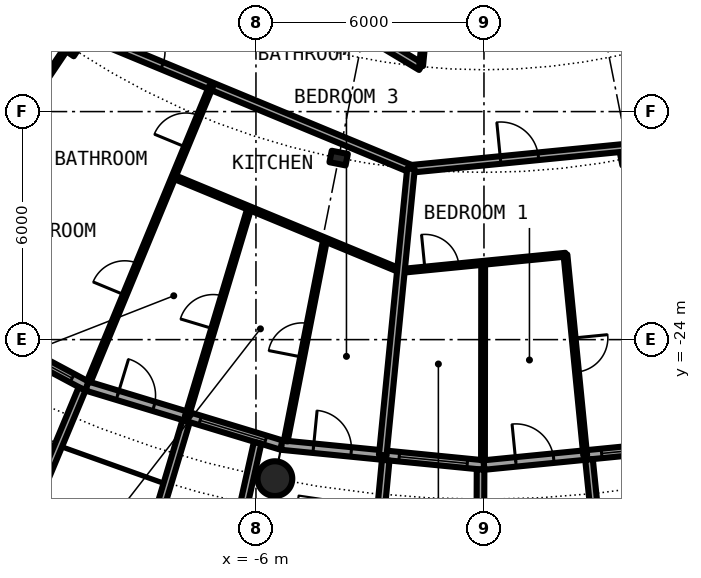
"""IFC4 building model, lengths in metres.
Left out: names, types, materials, properties, quantities, classifications, styles, units other than length and angle.
Written with IfcOpenShell. Run it as: python <this file> out.ifc"""

import sys

from ifc_helpers import new_model, si_unit, direction, frame, frame_2d, origin, origin_2d, place, context, subcontext, project, spatial, rectangle, hollow_circle, i_section, extrude, element, fill, save


model = new_model("IFC4")
c1 = context("Model", 3, precision=1e-05, world=origin(), true_north=direction((0.0, 1.0)))
c2 = subcontext(c1, "Body", "Model", "MODEL_VIEW")
j1 = project(units=[si_unit("LENGTHUNIT", "METRE"), si_unit("PLANEANGLEUNIT", "RADIAN")], contexts=[c1])
p1 = place(None, origin())
s1 = spatial("IfcSite", under=j1, at=p1, CompositionType="ELEMENT")
p2 = place(p1, origin())
s2 = spatial("IfcBuilding", under=s1, at=p2, CompositionType="ELEMENT")
p3 = place(p2, frame((0.0, 0.0, 120.8)))
s3 = spatial("IfcBuildingStorey", under=s2, at=p3, CompositionType="ELEMENT", Elevation=120.8)
p4 = place(p3, frame((-5.501, -27.658, 0.0), z_axis=(0.0, 0.0, 1.0), x_axis=(1.0, 0.0, 0.0)))
e1 = element("IfcColumn", 1, at=p4, inside=s3, PredefinedType="COLUMN", context=c2, shape_type="SweptSolid", body=[
    extrude(hollow_circle(Radius=0.457, WallThickness=0.04, at=origin_2d()), origin(), (0.0, 0.0, 1.0), 3.05),
])
for number, where, z_axis, x_axis in (
    (2, (-10.889, -16.297, 0.0), (0.0, 0.0, 1.0), (-0.556, -0.831, 0.0)),
    (3, (-3.824, -19.223, 0.0), (0.0, 0.0, 1.0), (-0.195, -0.981, 0.0)),
    (4, (3.824, -19.223, 0.0), (0.0, 0.0, 1.0), (0.195, -0.981, 0.0)),
):
    element("IfcColumn", number, at=place(p3, frame(where, z_axis=z_axis, x_axis=x_axis)), inside=s3, PredefinedType="COLUMN", context=c2, shape_type="SweptSolid", body=[
        extrude(i_section(OverallWidth=0.307, OverallDepth=0.432, WebThickness=0.021, FlangeThickness=0.04, FilletRadius=0.027, at=origin_2d()), origin(), (0.0, 0.0, 1.0), 3.05),
    ])
p5 = place(p3, frame((-15.167, -22.699, 0.0), z_axis=(0.0, 0.0, 1.0), x_axis=(0.881915646801, -0.471407246368, 0.0)))
e5 = element("IfcWall", 5, at=p5, inside=s3, PredefinedType="SOLIDWALL", context=c2, shape_type="SweptSolid", body=[
    extrude(rectangle(XDim=5.352, YDim=0.25, at=frame_2d((2.676, 0.0))), origin(), (0.0, 0.0, 1.0), 2.7),
])
p6 = place(p5, frame((0.841, 0.0, 0.0)))
e6 = element("IfcOpeningElement", 6, at=p6, cuts=e5, PredefinedType="OPENING", context=c2, shape_type="SweptSolid", body=[
    extrude(rectangle(XDim=1.0, YDim=2.2, at=frame_2d((0.5, 1.1))), frame((0.0, 0.135, 0.0), z_axis=(0.0, -1.0, 0.0), x_axis=(1.0, 0.0, 0.0)), (0.0, 0.0, 1.0), 0.27),
])
p7 = place(p5, frame((3.111, 0.0, 0.3)))
e7 = element("IfcOpeningElement", 7, at=p7, cuts=e5, PredefinedType="OPENING", context=c2, shape_type="SweptSolid", body=[
    extrude(rectangle(XDim=1.8, YDim=2.1, at=frame_2d((0.9, 1.05))), frame((0.0, 0.135, 0.0), z_axis=(0.0, -1.0, 0.0), x_axis=(1.0, 0.0, 0.0)), (0.0, 0.0, 1.0), 0.27),
])
p8 = place(p3, frame((-10.575, -25.295, -0.03), z_axis=(0.0, 0.0, 1.0), x_axis=(-0.385697364644, -0.922625353492, 0.0)))
e8 = element("IfcWall", 8, at=p8, inside=s3, PredefinedType="SOLIDWALL", context=c2, shape_type="SweptSolid", body=[
    extrude(rectangle(XDim=2.883, YDim=0.2, at=frame_2d((1.442, 0.0))), origin(), (0.0, 0.0, 1.0), 2.73),
])
p9 = place(p3, frame((-10.447, -25.222, 0.0), z_axis=(0.0, 0.0, 1.0), x_axis=(0.956965678721, -0.290201119486, 0.0)))
e9 = element("IfcWall", 9, at=p9, inside=s3, PredefinedType="SOLIDWALL", context=c2, shape_type="SweptSolid", body=[
    extrude(rectangle(XDim=5.351, YDim=0.25, at=frame_2d((2.676, 0.0))), origin(), (0.0, 0.0, 1.0), 2.7),
])
p10 = place(p9, frame((0.841, 0.0, 0.0)))
e10 = element("IfcOpeningElement", 10, at=p10, cuts=e9, PredefinedType="OPENING", context=c2, shape_type="SweptSolid", body=[
    extrude(rectangle(XDim=1.0, YDim=2.2, at=frame_2d((0.5, 1.1))), frame((0.0, 0.135, 0.0), z_axis=(0.0, -1.0, 0.0), x_axis=(1.0, 0.0, 0.0)), (0.0, 0.0, 1.0), 0.27),
])
p11 = place(p9, frame((3.111, 0.0, 0.3)))
e11 = element("IfcOpeningElement", 11, at=p11, cuts=e9, PredefinedType="OPENING", context=c2, shape_type="SweptSolid", body=[
    extrude(rectangle(XDim=1.8, YDim=2.1, at=frame_2d((0.9, 1.05))), frame((0.0, 0.135, 0.0), z_axis=(0.0, -1.0, 0.0), x_axis=(1.0, 0.0, 0.0)), (0.0, 0.0, 1.0), 0.27),
])
p12 = place(p3, frame((-7.837, -26.144, -0.03), z_axis=(0.0, 0.0, 1.0), x_axis=(-0.287064767992, -0.957911174889, 0.0)))
e12 = element("IfcWall", 12, at=p12, inside=s3, PredefinedType="SOLIDWALL", context=c2, shape_type="SweptSolid", body=[
    extrude(rectangle(XDim=3.006, YDim=0.2, at=frame_2d((1.503, 0.0))), origin(), (0.0, 0.0, 1.0), 2.73),
])
p13 = place(p3, frame((-5.957, -26.715, -0.03), z_axis=(0.0, 0.0, 1.0), x_axis=(-0.217857287091, -0.975980636315, 0.0)))
e13 = element("IfcWall", 13, at=p13, inside=s3, PredefinedType="SOLIDWALL", context=c2, shape_type="SweptSolid", body=[
    extrude(rectangle(XDim=2.928, YDim=0.2, at=frame_2d((1.464, 0.0))), origin(), (0.0, 0.0, 1.0), 2.73),
])
p14 = place(p3, frame((-5.326, -26.775, 0.0), z_axis=(0.0, 0.0, 1.0), x_axis=(0.995173996315, -0.098126026407, 0.0)))
e14 = element("IfcWall", 14, at=p14, inside=s3, PredefinedType="SOLIDWALL", context=c2, shape_type="SweptSolid", body=[
    extrude(rectangle(XDim=5.352, YDim=0.25, at=frame_2d((2.676, 0.0))), origin(), (0.0, 0.0, 1.0), 2.7),
])
p15 = place(p14, frame((0.841, 0.0, 0.0)))
e15 = element("IfcOpeningElement", 15, at=p15, cuts=e14, PredefinedType="OPENING", context=c2, shape_type="SweptSolid", body=[
    extrude(rectangle(XDim=1.0, YDim=2.2, at=frame_2d((0.5, 1.1))), frame((0.0, 0.135, 0.0), z_axis=(0.0, -1.0, 0.0), x_axis=(1.0, 0.0, 0.0)), (0.0, 0.0, 1.0), 0.27),
])
p16 = place(p14, frame((3.111, 0.0, 0.3)))
e16 = element("IfcOpeningElement", 16, at=p16, cuts=e14, PredefinedType="OPENING", context=c2, shape_type="SweptSolid", body=[
    extrude(rectangle(XDim=1.8, YDim=2.1, at=frame_2d((0.9, 1.05))), frame((0.0, 0.135, 0.0), z_axis=(0.0, -1.0, 0.0), x_axis=(1.0, 0.0, 0.0)), (0.0, 0.0, 1.0), 0.27),
])
p17 = place(p3, frame((-2.586, -27.171, -0.03), z_axis=(0.0, 0.0, 1.0), x_axis=(-0.094548432284, -0.995520262954, 0.0)))
e17 = element("IfcWall", 17, at=p17, inside=s3, PredefinedType="SOLIDWALL", context=c2, shape_type="SweptSolid", body=[
    extrude(rectangle(XDim=3.006, YDim=0.2, at=frame_2d((1.503, 0.0))), origin(), (0.0, 0.0, 1.0), 2.73),
])
p18 = place(p3, frame((-0.09, -27.417, -0.03), z_axis=(0.0, 0.0, 1.0), x_axis=(-0.00347308367, -0.999993968827, 0.0)))
e18 = element("IfcWall", 18, at=p18, inside=s3, PredefinedType="SOLIDWALL", context=c2, shape_type="SweptSolid", body=[
    extrude(rectangle(XDim=2.882, YDim=0.2, at=frame_2d((1.441, 0.0))), origin(), (0.0, 0.0, 1.0), 2.73),
])
p19 = place(p3, frame((0.0, -27.3, 0.0), z_axis=(0.0, 0.0, 1.0), x_axis=(0.995173996315, 0.098126026407, 0.0)))
e19 = element("IfcWall", 19, at=p19, inside=s3, PredefinedType="SOLIDWALL", context=c2, shape_type="SweptSolid", body=[
    extrude(rectangle(XDim=5.352, YDim=0.25, at=frame_2d((2.676, 0.0))), origin(), (0.0, 0.0, 1.0), 2.7),
])
p20 = place(p19, frame((0.841, 0.0, 0.0)))
e20 = element("IfcOpeningElement", 20, at=p20, cuts=e19, PredefinedType="OPENING", context=c2, shape_type="SweptSolid", body=[
    extrude(rectangle(XDim=1.0, YDim=2.2, at=frame_2d((0.5, 1.1))), frame((0.0, 0.135, 0.0), z_axis=(0.0, -1.0, 0.0), x_axis=(1.0, 0.0, 0.0)), (0.0, 0.0, 1.0), 0.27),
])
p21 = place(p19, frame((3.111, 0.0, 0.3)))
e21 = element("IfcOpeningElement", 21, at=p21, cuts=e19, PredefinedType="OPENING", context=c2, shape_type="SweptSolid", body=[
    extrude(rectangle(XDim=1.8, YDim=2.1, at=frame_2d((0.9, 1.05))), frame((0.0, 0.135, 0.0), z_axis=(0.0, -1.0, 0.0), x_axis=(1.0, 0.0, 0.0)), (0.0, 0.0, 1.0), 0.27),
])
p22 = place(p3, frame((2.764, -27.153, -0.03), z_axis=(0.0, 0.0, 1.0), x_axis=(0.101505487237, -0.994834979311, 0.0)))
e22 = element("IfcWall", 22, at=p22, inside=s3, PredefinedType="SOLIDWALL", context=c2, shape_type="SweptSolid", body=[
    extrude(rectangle(XDim=3.007, YDim=0.2, at=frame_2d((1.503, 0.0))), origin(), (0.0, 0.0, 1.0), 2.73),
])
p23 = place(p3, frame((-2.193, -22.194, 0.0), z_axis=(0.0, 0.0, 1.0), x_axis=(0.995173152282, 0.098134586035, 0.0)))
e23 = element("IfcWall", 23, at=p23, inside=s3, PredefinedType="PARTITIONING", context=c2, shape_type="SweptSolid", body=[
    extrude(rectangle(XDim=4.361, YDim=0.1, at=frame_2d((2.181, 0.0))), origin(), (0.0, 0.0, 1.0), 2.7),
])
p24 = place(p23, frame((0.641, 0.0, 0.0)))
e24 = element("IfcOpeningElement", 24, at=p24, cuts=e23, PredefinedType="OPENING", context=c2, shape_type="SweptSolid", body=[
    extrude(rectangle(XDim=0.9, YDim=2.3, at=frame_2d((0.45, 1.15))), frame((0.0, 0.06, 0.0), z_axis=(0.0, -1.0, 0.0), x_axis=(1.0, 0.0, 0.0)), (0.0, 0.0, 1.0), 0.12),
])
p25 = place(p3, frame((-8.164, -19.716, 0.0), z_axis=(0.0, 0.0, 1.0), x_axis=(0.92387253274, -0.38270033087, 0.0)))
e25 = element("IfcWall", 25, at=p25, inside=s3, PredefinedType="PARTITIONING", context=c2, shape_type="SweptSolid", body=[
    extrude(rectangle(XDim=6.475, YDim=0.1, at=frame_2d((3.238, 0.0))), origin(), (0.0, 0.0, 1.0), 2.7),
])
p26 = place(p3, frame((-1.921, -19.506, 0.0), z_axis=(0.0, 0.0, 1.0), x_axis=(0.995172982325, 0.098136309541, 0.0)))
e26 = element("IfcWall", 26, at=p26, inside=s3, PredefinedType="PARTITIONING", context=c2, shape_type="SweptSolid", body=[
    extrude(rectangle(XDim=7.655, YDim=0.2, at=frame_2d((3.827, 0.0))), origin(), (0.0, 0.0, 1.0), 2.39),
])
p27 = place(p26, frame((2.368, 0.0, 0.0)))
e27 = element("IfcOpeningElement", 27, at=p27, cuts=e26, PredefinedType="OPENING", context=c2, shape_type="SweptSolid", body=[
    extrude(rectangle(XDim=1.0, YDim=2.3, at=frame_2d((0.5, 1.15))), frame((0.0, 0.11, 0.0), z_axis=(0.0, -1.0, 0.0), x_axis=(1.0, 0.0, 0.0)), (0.0, 0.0, 1.0), 0.22),
])
p28 = place(p3, frame((-12.434, -15.151, 0.0), z_axis=(0.0, 0.0, 1.0), x_axis=(0.923888467236, -0.382661861319, 0.0)))
e28 = element("IfcWall", 28, at=p28, inside=s3, PredefinedType="PARTITIONING", context=c2, shape_type="SweptSolid", body=[
    extrude(rectangle(XDim=11.381, YDim=0.2, at=frame_2d((5.691, 0.0))), origin(), (0.0, 0.0, 1.0), 2.7),
])
p29 = place(p28, frame((3.292, 0.0, 0.0)))
e29 = element("IfcOpeningElement", 29, at=p29, cuts=e28, PredefinedType="OPENING", context=c2, shape_type="SweptSolid", body=[
    extrude(rectangle(XDim=1.0, YDim=2.3, at=frame_2d((0.5, 1.15))), frame((0.0, 0.11, 0.0), z_axis=(0.0, -1.0, 0.0), x_axis=(1.0, 0.0, 0.0)), (0.0, 0.0, 1.0), 0.22),
])
p30 = place(p3, frame((-14.051, -9.391, 0.0), z_axis=(0.0, 0.0, 1.0), x_axis=(0.857768591583, -0.514036033069, 0.0)))
e30 = element("IfcWall", 30, at=p30, inside=s3, PredefinedType="PARTITIONING", context=c2, shape_type="SweptSolid", body=[
    extrude(rectangle(XDim=14.45, YDim=0.2, at=frame_2d((7.225, 0.0))), origin(), (0.0, 0.0, 1.0), 2.7),
])
p31 = place(p30, frame((9.133, 0.0, 0.0)))
e31 = element("IfcOpeningElement", 31, at=p31, cuts=e30, PredefinedType="OPENING", context=c2, shape_type="SweptSolid", body=[
    extrude(rectangle(XDim=1.0, YDim=2.3, at=frame_2d((0.5, 1.15))), frame((0.0, 0.11, 0.0), z_axis=(0.0, -1.0, 0.0), x_axis=(1.0, 0.0, 0.0)), (0.0, 0.0, 1.0), 0.22),
])
p32 = place(p3, frame((-12.153, -18.064, 0.0), z_axis=(0.0, 0.0, 1.0), x_axis=(0.557893831879, 0.829912328112, 0.0)))
e32 = element("IfcWall", 32, at=p32, inside=s3, PredefinedType="PARTITIONING", context=c2, shape_type="SweptSolid", body=[
    extrude(rectangle(XDim=1.956, YDim=0.1, at=frame_2d((0.978, 0.0))), origin(), (0.0, 0.0, 1.0), 2.7),
])
p33 = place(p32, frame((0.6, 0.0, 0.0)))
e33 = element("IfcOpeningElement", 33, at=p33, cuts=e32, PredefinedType="OPENING", context=c2, shape_type="SweptSolid", body=[
    extrude(rectangle(XDim=0.9, YDim=2.3, at=frame_2d((0.45, 1.15))), frame((0.0, 0.06, 0.0), z_axis=(0.0, -1.0, 0.0), x_axis=(1.0, 0.0, 0.0)), (0.0, 0.0, 1.0), 0.12),
])
p34 = place(p3, frame((-10.399, -25.106, 0.0), z_axis=(0.0, 0.0, 1.0), x_axis=(0.382697543868, 0.923873687209, 0.0)))
e34 = element("IfcWall", 34, at=p34, inside=s3, PredefinedType="PARTITIONING", context=c2, shape_type="SweptSolid", body=[
    extrude(rectangle(XDim=8.419, YDim=0.1, at=frame_2d((4.209, 0.0))), origin(), (0.0, 0.0, 1.0), 2.7),
])
p35 = place(p34, frame((6.677, 0.0, 0.0)))
e35 = element("IfcOpeningElement", 35, at=p35, cuts=e34, PredefinedType="OPENING", context=c2, shape_type="SweptSolid", body=[
    extrude(rectangle(XDim=0.9, YDim=2.3, at=frame_2d((0.45, 1.15))), frame((0.0, 0.06, 0.0), z_axis=(0.0, -1.0, 0.0), x_axis=(1.0, 0.0, 0.0)), (0.0, 0.0, 1.0), 0.12),
])
p36 = place(p34, frame((2.468, 0.0, 0.0)))
e36 = element("IfcOpeningElement", 36, at=p36, cuts=e34, PredefinedType="OPENING", context=c2, shape_type="SweptSolid", body=[
    extrude(rectangle(XDim=0.9, YDim=2.3, at=frame_2d((0.45, 1.15))), frame((0.0, 0.06, 0.0), z_axis=(0.0, -1.0, 0.0), x_axis=(1.0, 0.0, 0.0)), (0.0, 0.0, 1.0), 0.12),
])
p37 = place(p3, frame((-7.821, -26.025, 0.0), z_axis=(0.0, 0.0, 1.0), x_axis=(0.287793773423, 0.957692405723, 0.0)))
e37 = element("IfcWall", 37, at=p37, inside=s3, PredefinedType="PARTITIONING", context=c2, shape_type="SweptSolid", body=[
    extrude(rectangle(XDim=5.726, YDim=0.1, at=frame_2d((2.863, 0.0))), origin(), (0.0, 0.0, 1.0), 2.7),
])
p38 = place(p37, frame((2.413, 0.0, 0.0)))
e38 = element("IfcOpeningElement", 38, at=p38, cuts=e37, PredefinedType="OPENING", context=c2, shape_type="SweptSolid", body=[
    extrude(rectangle(XDim=0.9, YDim=2.3, at=frame_2d((0.45, 1.15))), frame((0.0, 0.06, 0.0), z_axis=(0.0, -1.0, 0.0), x_axis=(1.0, 0.0, 0.0)), (0.0, 0.0, 1.0), 0.12),
])
p39 = place(p3, frame((-5.217, -26.67, 0.0), z_axis=(0.0, 0.0, 1.0), x_axis=(0.192109041462, 0.981373586453, 0.0)))
e39 = element("IfcWall", 39, at=p39, inside=s3, PredefinedType="PARTITIONING", context=c2, shape_type="SweptSolid", body=[
    extrude(rectangle(XDim=5.404, YDim=0.1, at=frame_2d((2.702, 0.0))), origin(), (0.0, 0.0, 1.0), 2.7),
])
p40 = place(p39, frame((2.252, 0.0, 0.0)))
e40 = element("IfcOpeningElement", 40, at=p40, cuts=e39, PredefinedType="OPENING", context=c2, shape_type="SweptSolid", body=[
    extrude(rectangle(XDim=0.9, YDim=2.3, at=frame_2d((0.45, 1.15))), frame((0.0, 0.06, 0.0), z_axis=(0.0, -1.0, 0.0), x_axis=(1.0, 0.0, 0.0)), (0.0, 0.0, 1.0), 0.12),
])
p41 = place(p3, frame((-2.664, -27.044, 0.0), z_axis=(0.0, 0.0, 1.0), x_axis=(0.098115395479, 0.995175044487, 0.0)))
e41 = element("IfcWall", 41, at=p41, inside=s3, PredefinedType="PARTITIONING", context=c2, shape_type="SweptSolid", body=[
    extrude(rectangle(XDim=7.574, YDim=0.2, at=frame_2d((3.787, 0.0))), origin(), (0.0, 0.0, 1.0), 2.7),
])
p42 = place(p3, frame((-0.026, -27.175, 0.0), z_axis=(0.0, 0.0, 1.0), x_axis=(0.00093971673, 0.999999558466, 0.0)))
e42 = element("IfcWall", 42, at=p42, inside=s3, PredefinedType="PARTITIONING", context=c2, shape_type="SweptSolid", body=[
    extrude(rectangle(XDim=5.196, YDim=0.1, at=frame_2d((2.598, 0.0))), origin(), (0.0, 0.0, 1.0), 2.7),
])
p43 = place(p3, frame((2.144, -21.766, 0.0), z_axis=(0.0, 0.0, 1.0), x_axis=(0.098054199821, -0.995181075934, 0.0)))
e43 = element("IfcWall", 43, at=p43, inside=s3, PredefinedType="PARTITIONING", context=c2, shape_type="SweptSolid", body=[
    extrude(rectangle(XDim=5.303, YDim=0.1, at=frame_2d((2.652, 0.0))), origin(), (0.0, 0.0, 1.0), 2.7),
])
p44 = place(p43, frame((2.202, 0.0, 0.0)))
e44 = element("IfcOpeningElement", 44, at=p44, cuts=e43, PredefinedType="OPENING", context=c2, shape_type="SweptSolid", body=[
    extrude(rectangle(XDim=0.9, YDim=2.3, at=frame_2d((0.45, 1.15))), frame((0.0, 0.06, 0.0), z_axis=(0.0, -1.0, 0.0), x_axis=(1.0, 0.0, 0.0)), (0.0, 0.0, 1.0), 0.12),
])
p45 = place(p3, frame((-1.394, -14.154, 0.0), z_axis=(0.0, 0.0, 1.0), x_axis=(-0.097901702875, -0.995196089509, 0.0)))
e45 = element("IfcWall", 45, at=p45, inside=s3, PredefinedType="PARTITIONING", context=c2, shape_type="SweptSolid", body=[
    extrude(rectangle(XDim=2.656, YDim=0.1, at=frame_2d((1.328, 0.0))), origin(), (0.0, 0.0, 1.0), 2.7),
])
p46 = place(p7, origin())
e46 = element("IfcWindow", 46, at=p46, inside=s3, PartitioningType="SINGLE_PANEL", PredefinedType="WINDOW", context=c2, shape_type="SweptSolid", body=[
    extrude(rectangle(XDim=1.8, YDim=2.1, at=frame_2d((0.9, 1.05))), frame((0.0, 0.03, 0.0), z_axis=(0.0, -1.0, 0.0), x_axis=(1.0, 0.0, 0.0)), (0.0, 0.0, 1.0), 0.06),
])
fill(e7, e46)
p47 = place(p10, origin())
e47 = element("IfcDoor", 47, at=p47, inside=s3, OperationType="SINGLE_SWING_LEFT", PredefinedType="DOOR", context=c2, shape_type="SweptSolid", body=[
    extrude(rectangle(XDim=1.0, YDim=2.2, at=frame_2d((0.5, 1.1))), frame((0.0, 0.025, 0.0), z_axis=(0.0, -1.0, 0.0), x_axis=(1.0, 0.0, 0.0)), (0.0, 0.0, 1.0), 0.05),
])
fill(e10, e47)
p48 = place(p11, origin())
e48 = element("IfcWindow", 48, at=p48, inside=s3, PartitioningType="SINGLE_PANEL", PredefinedType="WINDOW", context=c2, shape_type="SweptSolid", body=[
    extrude(rectangle(XDim=1.8, YDim=2.1, at=frame_2d((0.9, 1.05))), frame((0.0, 0.03, 0.0), z_axis=(0.0, -1.0, 0.0), x_axis=(1.0, 0.0, 0.0)), (0.0, 0.0, 1.0), 0.06),
])
fill(e11, e48)
p49 = place(p15, origin())
e49 = element("IfcDoor", 49, at=p49, inside=s3, OperationType="SINGLE_SWING_LEFT", PredefinedType="DOOR", context=c2, shape_type="SweptSolid", body=[
    extrude(rectangle(XDim=1.0, YDim=2.2, at=frame_2d((0.5, 1.1))), frame((0.0, 0.025, 0.0), z_axis=(0.0, -1.0, 0.0), x_axis=(1.0, 0.0, 0.0)), (0.0, 0.0, 1.0), 0.05),
])
fill(e15, e49)
p50 = place(p16, origin())
e50 = element("IfcWindow", 50, at=p50, inside=s3, PartitioningType="SINGLE_PANEL", PredefinedType="WINDOW", context=c2, shape_type="SweptSolid", body=[
    extrude(rectangle(XDim=1.8, YDim=2.1, at=frame_2d((0.9, 1.05))), frame((0.0, 0.03, 0.0), z_axis=(0.0, -1.0, 0.0), x_axis=(1.0, 0.0, 0.0)), (0.0, 0.0, 1.0), 0.06),
])
fill(e16, e50)
p51 = place(p20, origin())
e51 = element("IfcDoor", 51, at=p51, inside=s3, OperationType="SINGLE_SWING_LEFT", PredefinedType="DOOR", context=c2, shape_type="SweptSolid", body=[
    extrude(rectangle(XDim=1.0, YDim=2.2, at=frame_2d((0.5, 1.1))), frame((0.0, 0.025, 0.0), z_axis=(0.0, -1.0, 0.0), x_axis=(1.0, 0.0, 0.0)), (0.0, 0.0, 1.0), 0.05),
])
fill(e20, e51)
p52 = place(p21, origin())
e52 = element("IfcWindow", 52, at=p52, inside=s3, PartitioningType="SINGLE_PANEL", PredefinedType="WINDOW", context=c2, shape_type="SweptSolid", body=[
    extrude(rectangle(XDim=1.8, YDim=2.1, at=frame_2d((0.9, 1.05))), frame((0.0, 0.03, 0.0), z_axis=(0.0, -1.0, 0.0), x_axis=(1.0, 0.0, 0.0)), (0.0, 0.0, 1.0), 0.06),
])
fill(e21, e52)
p53 = place(p29, origin())
e53 = element("IfcDoor", 53, at=p53, inside=s3, OperationType="SINGLE_SWING_LEFT", PredefinedType="DOOR", context=c2, shape_type="SweptSolid", body=[
    extrude(rectangle(XDim=1.0, YDim=2.3, at=frame_2d((0.5, 1.15))), frame((0.0, 0.025, 0.0), z_axis=(0.0, -1.0, 0.0), x_axis=(1.0, 0.0, 0.0)), (0.0, 0.0, 1.0), 0.05),
])
fill(e29, e53)
p54 = place(p33, origin())
e54 = element("IfcDoor", 54, at=p54, inside=s3, OperationType="SINGLE_SWING_RIGHT", PredefinedType="DOOR", context=c2, shape_type="SweptSolid", body=[
    extrude(rectangle(XDim=0.9, YDim=2.3, at=frame_2d((0.45, 1.15))), frame((0.0, 0.025, 0.0), z_axis=(0.0, -1.0, 0.0), x_axis=(1.0, 0.0, 0.0)), (0.0, 0.0, 1.0), 0.05),
])
fill(e33, e54)
p55 = place(p35, origin())
e55 = element("IfcDoor", 55, at=p55, inside=s3, OperationType="SINGLE_SWING_RIGHT", PredefinedType="DOOR", context=c2, shape_type="SweptSolid", body=[
    extrude(rectangle(XDim=0.9, YDim=2.3, at=frame_2d((0.45, 1.15))), frame((0.0, 0.025, 0.0), z_axis=(0.0, -1.0, 0.0), x_axis=(1.0, 0.0, 0.0)), (0.0, 0.0, 1.0), 0.05),
])
fill(e35, e55)
p56 = place(p36, origin())
e56 = element("IfcDoor", 56, at=p56, inside=s3, OperationType="SINGLE_SWING_LEFT", PredefinedType="DOOR", context=c2, shape_type="SweptSolid", body=[
    extrude(rectangle(XDim=0.9, YDim=2.3, at=frame_2d((0.45, 1.15))), frame((0.0, 0.025, 0.0), z_axis=(0.0, -1.0, 0.0), x_axis=(1.0, 0.0, 0.0)), (0.0, 0.0, 1.0), 0.05),
])
fill(e36, e56)
p57 = place(p38, origin())
e57 = element("IfcDoor", 57, at=p57, inside=s3, OperationType="SINGLE_SWING_LEFT", PredefinedType="DOOR", context=c2, shape_type="SweptSolid", body=[
    extrude(rectangle(XDim=0.9, YDim=2.3, at=frame_2d((0.45, 1.15))), frame((0.0, 0.025, 0.0), z_axis=(0.0, -1.0, 0.0), x_axis=(1.0, 0.0, 0.0)), (0.0, 0.0, 1.0), 0.05),
])
fill(e38, e57)
p58 = place(p40, origin())
e58 = element("IfcDoor", 58, at=p58, inside=s3, OperationType="SINGLE_SWING_RIGHT", PredefinedType="DOOR", context=c2, shape_type="SweptSolid", body=[
    extrude(rectangle(XDim=0.9, YDim=2.3, at=frame_2d((0.45, 1.15))), frame((0.0, 0.025, 0.0), z_axis=(0.0, -1.0, 0.0), x_axis=(1.0, 0.0, 0.0)), (0.0, 0.0, 1.0), 0.05),
])
fill(e40, e58)
p59 = place(p27, origin())
e59 = element("IfcDoor", 59, at=p59, inside=s3, OperationType="SINGLE_SWING_LEFT", PredefinedType="DOOR", context=c2, shape_type="SweptSolid", body=[
    extrude(rectangle(XDim=1.0, YDim=2.3, at=frame_2d((0.5, 1.15))), frame((0.0, 0.025, 0.0), z_axis=(0.0, -1.0, 0.0), x_axis=(1.0, 0.0, 0.0)), (0.0, 0.0, 1.0), 0.05),
])
fill(e27, e59)
p60 = place(p44, origin())
e60 = element("IfcDoor", 60, at=p60, inside=s3, OperationType="SINGLE_SWING_RIGHT", PredefinedType="DOOR", context=c2, shape_type="SweptSolid", body=[
    extrude(rectangle(XDim=0.9, YDim=2.3, at=frame_2d((0.45, 1.15))), frame((0.0, 0.025, 0.0), z_axis=(0.0, -1.0, 0.0), x_axis=(1.0, 0.0, 0.0)), (0.0, 0.0, 1.0), 0.05),
])
fill(e44, e60)
p61 = place(p24, origin())
e61 = element("IfcDoor", 61, at=p61, inside=s3, OperationType="SINGLE_SWING_LEFT", PredefinedType="DOOR", context=c2, shape_type="SweptSolid", body=[
    extrude(rectangle(XDim=0.9, YDim=2.3, at=frame_2d((0.45, 1.15))), frame((0.0, 0.025, 0.0), z_axis=(0.0, -1.0, 0.0), x_axis=(1.0, 0.0, 0.0)), (0.0, 0.0, 1.0), 0.05),
])
fill(e24, e61)
save(model, sys.argv[1])
